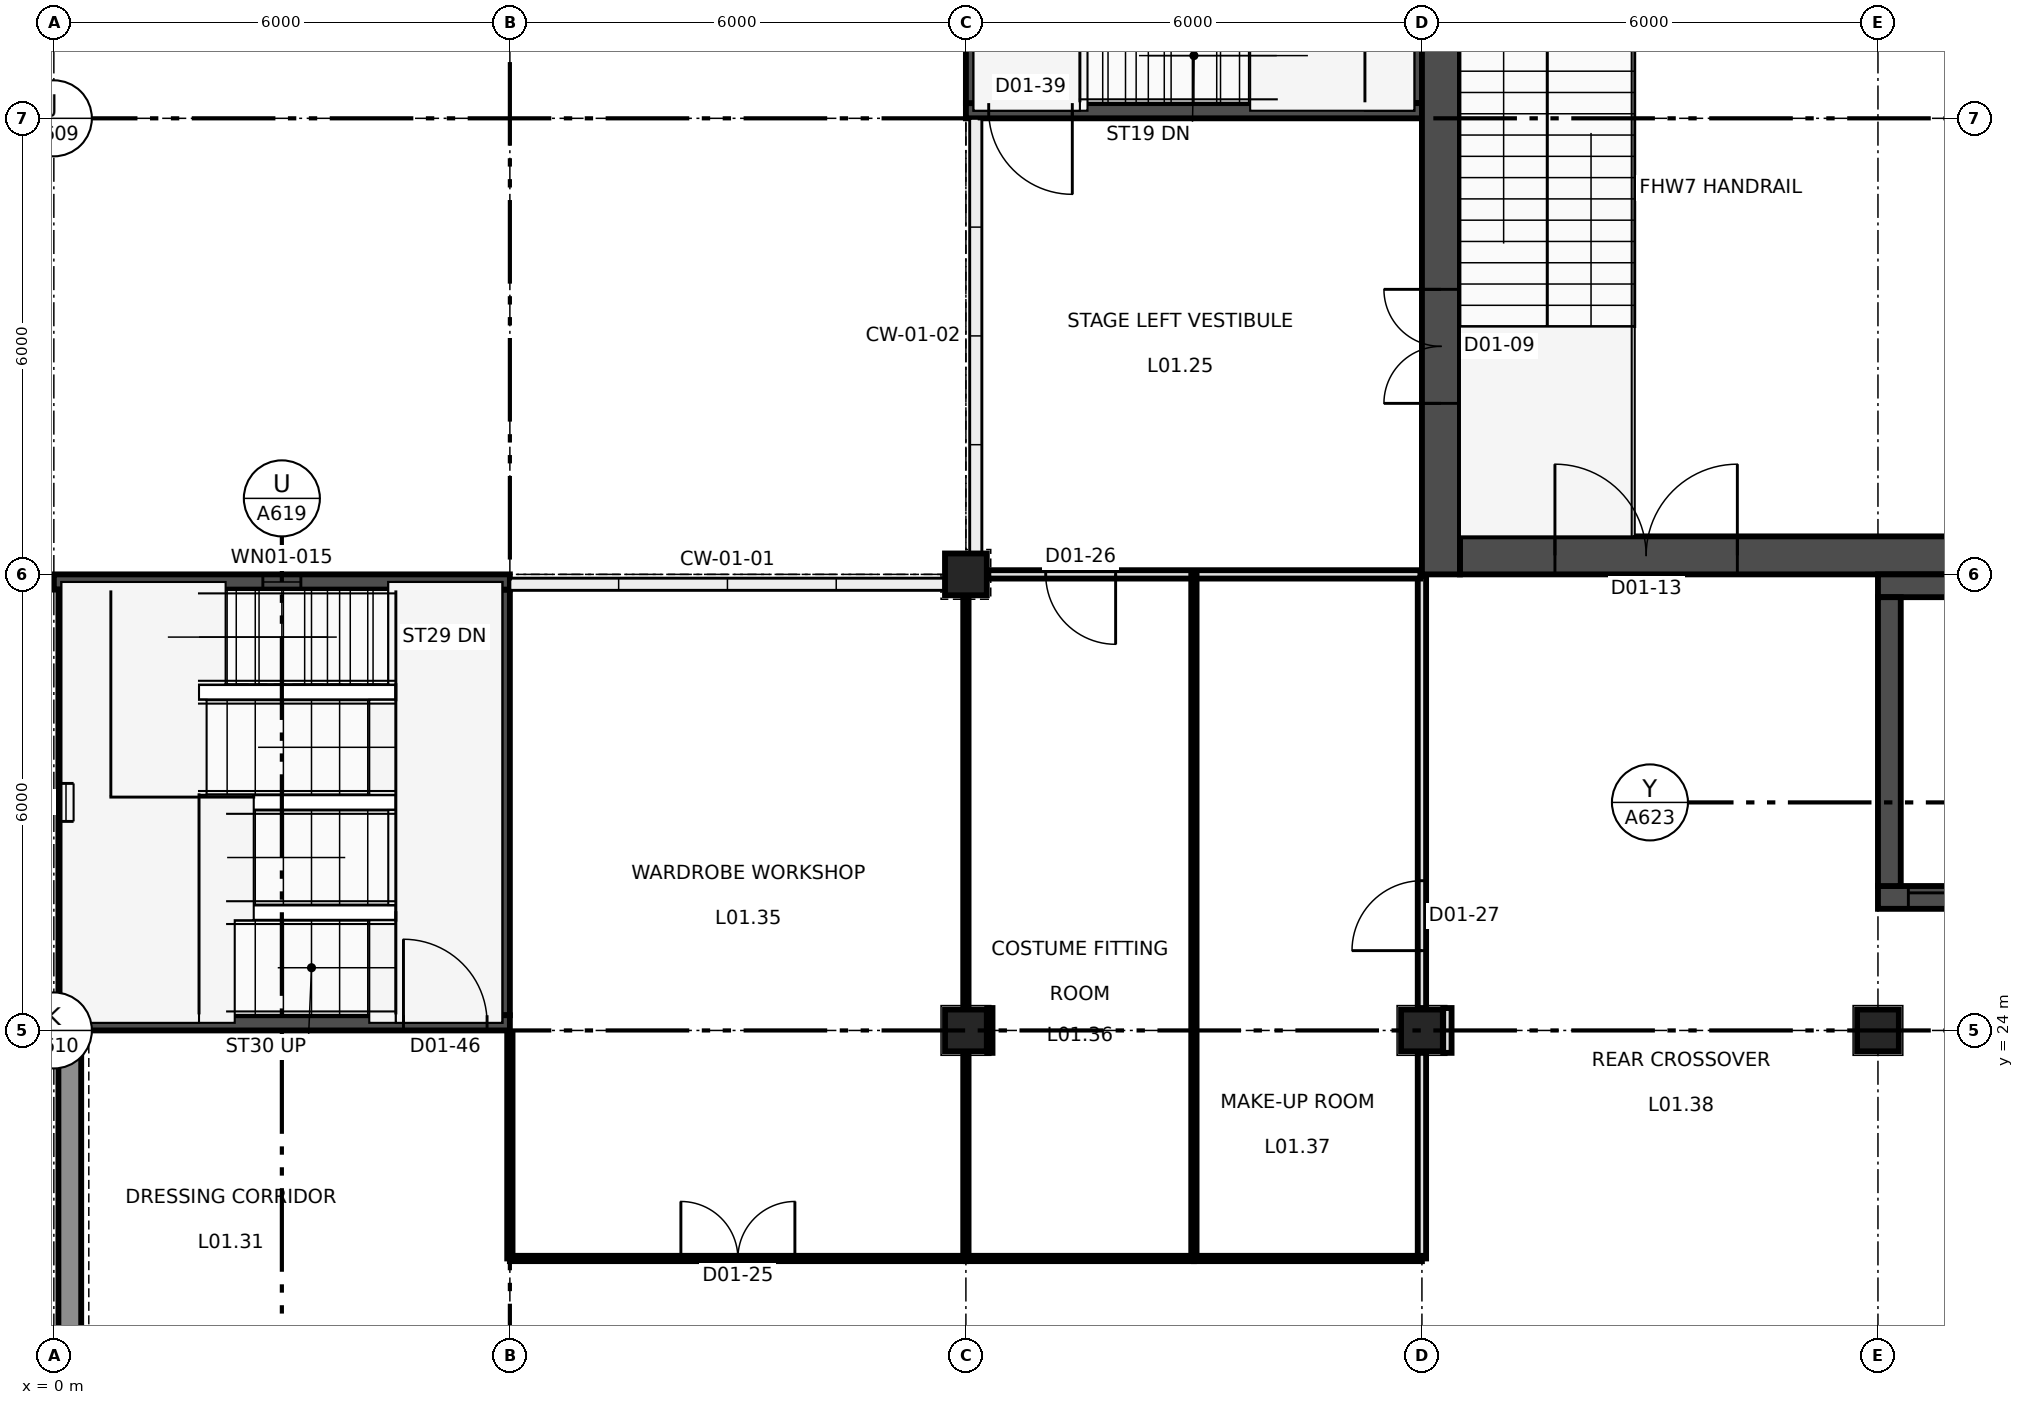
"""IFC4 building model, lengths in metres.
Left out: names, types, materials, properties, quantities, classifications, styles, units other than length and angle.
Written with IfcOpenShell. Run it as: python <this file> out.ifc"""

import sys

from ifc_helpers import new_model, si_unit, direction, frame, frame_2d, origin, origin_2d, place, context, subcontext, project, spatial, rectangle, extrude, element, fill, save


model = new_model("IFC4")
c1 = context("Model", 3, precision=1e-05, world=origin(), true_north=direction((0.0, 1.0)))
c2 = subcontext(c1, "Body", "Model", "MODEL_VIEW")
j1 = project(units=[si_unit("LENGTHUNIT", "METRE"), si_unit("PLANEANGLEUNIT", "RADIAN")], contexts=[c1])
p1 = place(None, origin())
s1 = spatial("IfcSite", under=j1, at=p1, CompositionType="ELEMENT")
p2 = place(p1, origin())
s2 = spatial("IfcBuilding", under=s1, at=p2, CompositionType="ELEMENT")
p3 = place(p2, frame((0.0, 0.0, 7.0)))
s3 = spatial("IfcBuildingStorey", under=s2, at=p3, CompositionType="ELEMENT", Elevation=7.0)
for number, where, z_axis, x_axis in (
    (1, (12.0, 24.0, 0.0), (0.0, 0.0, 1.0), (1.0, 0.0, 0.0)),
    (2, (18.0, 24.0, 0.0), (0.0, 0.0, 1.0), (1.0, 0.0, 0.0)),
    (3, (24.0, 24.0, 0.0), (0.0, 0.0, 1.0), (1.0, 0.0, 0.0)),
    (4, (12.0, 30.0, 0.0), (0.0, 0.0, 1.0), (1.0, 0.0, 0.0)),
):
    element("IfcColumn", number, at=place(p3, frame(where, z_axis=z_axis, x_axis=x_axis)), inside=s3, PredefinedType="COLUMN", context=c2, shape_type="SweptSolid", body=[
        extrude(rectangle(XDim=0.55, YDim=0.55, at=origin_2d()), origin(), (0.0, 0.0, 1.0), 5.0),
    ])
p4 = place(p3, frame((12.0, 36.1, 0.0), z_axis=(0.0, 0.0, 1.0), x_axis=(1.0, 0.0, 0.0)))
e5 = element("IfcWall", 5, at=p4, inside=s3, PredefinedType="SHEAR", context=c2, shape_type="SweptSolid", body=[
    extrude(rectangle(XDim=6.0, YDim=0.2, at=frame_2d((3.0, 0.0))), origin(), (0.0, 0.0, 1.0), 5.0),
])
p5 = place(p4, frame((0.3, 0.0, 0.0)))
e6 = element("IfcOpeningElement", 6, at=p5, cuts=e5, PredefinedType="OPENING", context=c2, shape_type="SweptSolid", body=[
    extrude(rectangle(XDim=1.1, YDim=2.2, at=frame_2d((0.55, 1.1))), frame((0.0, 0.11, 0.0), z_axis=(0.0, -1.0, 0.0), x_axis=(1.0, 0.0, 0.0)), (0.0, 0.0, 1.0), 0.22),
])
for number, where, z_axis, x_axis in (
    (7, (12.1, 36.2, 0.0), (0.0, 0.0, 1.0), (0.0, 1.0, 0.0)),
    (8, (17.9, 36.2, 0.0), (0.0, 0.0, 1.0), (0.0, 1.0, 0.0)),
):
    element("IfcWall", number, at=place(p3, frame(where, z_axis=z_axis, x_axis=x_axis)), inside=s3, PredefinedType="SHEAR", context=c2, shape_type="SweptSolid", body=[
        extrude(rectangle(XDim=5.6, YDim=0.2, at=frame_2d((2.8, 0.0))), origin(), (0.0, 0.0, 1.0), 5.0),
    ])
p6 = place(p3, frame((0.0, 29.9, 0.0), z_axis=(0.0, 0.0, 1.0), x_axis=(1.0, 0.0, 0.0)))
e9 = element("IfcWall", 9, at=p6, inside=s3, PredefinedType="SHEAR", context=c2, shape_type="SweptSolid", body=[
    extrude(rectangle(XDim=6.0, YDim=0.2, at=frame_2d((3.0, 0.0))), origin(), (0.0, 0.0, 1.0), 5.0),
])
p7 = place(p6, frame((2.75, 0.0, 0.9)))
e10 = element("IfcOpeningElement", 10, at=p7, cuts=e9, PredefinedType="OPENING", context=c2, shape_type="SweptSolid", body=[
    extrude(rectangle(XDim=0.5, YDim=2.1, at=frame_2d((0.25, 1.05))), frame((0.0, 0.11, 0.0), z_axis=(0.0, -1.0, 0.0), x_axis=(1.0, 0.0, 0.0)), (0.0, 0.0, 1.0), 0.22),
])
p8 = place(p3, frame((0.0, 24.1, 0.0), z_axis=(0.0, 0.0, 1.0), x_axis=(1.0, 0.0, 0.0)))
e11 = element("IfcWall", 11, at=p8, inside=s3, PredefinedType="SHEAR", context=c2, shape_type="SweptSolid", body=[
    extrude(rectangle(XDim=6.0, YDim=0.2, at=frame_2d((3.0, 0.0))), origin(), (0.0, 0.0, 1.0), 5.0),
])
p9 = place(p8, frame((4.6, 0.0, 0.0)))
e12 = element("IfcOpeningElement", 12, at=p9, cuts=e11, PredefinedType="OPENING", context=c2, shape_type="SweptSolid", body=[
    extrude(rectangle(XDim=1.1, YDim=2.2, at=frame_2d((0.55, 1.1))), frame((0.0, 0.11, 0.0), z_axis=(0.0, -1.0, 0.0), x_axis=(1.0, 0.0, 0.0)), (0.0, 0.0, 1.0), 0.22),
])
p10 = place(p3, frame((0.16, 24.2, 0.0), z_axis=(0.0, 0.0, 1.0), x_axis=(0.0, 1.0, 0.0)))
e13 = element("IfcWall", 13, at=p10, inside=s3, PredefinedType="SHEAR", context=c2, shape_type="SweptSolid", body=[
    extrude(rectangle(XDim=5.6, YDim=0.2, at=frame_2d((2.8, 0.0))), origin(), (0.0, 0.0, 1.0), 5.0),
])
p11 = place(p10, frame((2.55, 0.0, 0.9)))
e14 = element("IfcOpeningElement", 14, at=p11, cuts=e13, PredefinedType="OPENING", context=c2, shape_type="SweptSolid", body=[
    extrude(rectangle(XDim=0.5, YDim=2.1, at=frame_2d((0.25, 1.05))), frame((0.0, 0.11, 0.0), z_axis=(0.0, -1.0, 0.0), x_axis=(1.0, 0.0, 0.0)), (0.0, 0.0, 1.0), 0.22),
])
p12 = place(p3, frame((5.9, 24.2, 0.0), z_axis=(0.0, 0.0, 1.0), x_axis=(0.0, 1.0, 0.0)))
e15 = element("IfcWall", 15, at=p12, inside=s3, PredefinedType="SHEAR", context=c2, shape_type="SweptSolid", body=[
    extrude(rectangle(XDim=5.6, YDim=0.2, at=frame_2d((2.8, 0.0))), origin(), (0.0, 0.0, 1.0), 5.0),
])
p13 = place(p3, frame((24.0, 29.85, 0.0), z_axis=(0.0, 0.0, 1.0), x_axis=(1.0, 0.0, 0.0)))
e16 = element("IfcWall", 16, at=p13, inside=s3, PredefinedType="SHEAR", context=c2, shape_type="SweptSolid", body=[
    extrude(rectangle(XDim=3.2, YDim=0.3, at=frame_2d((1.6, 0.0))), origin(), (0.0, 0.0, 1.0), 5.0),
])
p14 = place(p3, frame((24.0, 25.75, 0.0), z_axis=(0.0, 0.0, 1.0), x_axis=(1.0, 0.0, 0.0)))
e17 = element("IfcWall", 17, at=p14, inside=s3, PredefinedType="SHEAR", context=c2, shape_type="SweptSolid", body=[
    extrude(rectangle(XDim=3.2, YDim=0.3, at=frame_2d((1.6, 0.0))), origin(), (0.0, 0.0, 1.0), 5.0),
])
p15 = place(p14, frame((0.4, 0.0, 0.0)))
e18 = element("IfcOpeningElement", 18, at=p15, cuts=e17, PredefinedType="OPENING", context=c2, shape_type="SweptSolid", body=[
    extrude(rectangle(XDim=2.4, YDim=2.4, at=frame_2d((1.2, 1.2))), frame((0.0, 0.16, 0.0), z_axis=(0.0, -1.0, 0.0), x_axis=(1.0, 0.0, 0.0)), (0.0, 0.0, 1.0), 0.32),
])
p16 = place(p3, frame((24.15, 25.9, 0.0), z_axis=(0.0, 0.0, 1.0), x_axis=(0.0, 1.0, 0.0)))
e19 = element("IfcWall", 19, at=p16, inside=s3, PredefinedType="SHEAR", context=c2, shape_type="SweptSolid", body=[
    extrude(rectangle(XDim=3.8, YDim=0.3, at=frame_2d((1.9, 0.0))), origin(), (0.0, 0.0, 1.0), 5.0),
])
p17 = place(p3, frame((0.21, 6.0, 0.0), z_axis=(0.0, 0.0, 1.0), x_axis=(0.0, 1.0, 0.0)))
e20 = element("IfcWall", 20, at=p17, inside=s3, PredefinedType="SOLIDWALL", context=c2, shape_type="SweptSolid", body=[
    extrude(rectangle(XDim=18.0, YDim=0.3, at=frame_2d((9.0, 0.0))), origin(), (0.0, 0.0, 1.0), 5.0),
])
p18 = place(p3, frame((18.25, 30.0, 0.0), z_axis=(0.0, 0.0, 1.0), x_axis=(0.0, 1.0, 0.0)))
e21 = element("IfcWall", 21, at=p18, inside=s3, PredefinedType="SHEAR", context=c2, shape_type="SweptSolid", body=[
    extrude(rectangle(XDim=24.0, YDim=0.5, at=frame_2d((12.0, 0.0))), origin(), (0.0, 0.0, 1.0), 5.0),
])
p19 = place(p18, frame((2.25, 0.0, 0.0)))
e22 = element("IfcOpeningElement", 22, at=p19, cuts=e21, PredefinedType="OPENING", context=c2, shape_type="SweptSolid", body=[
    extrude(rectangle(XDim=1.5, YDim=2.1, at=frame_2d((0.75, 1.05))), frame((0.0, 0.26, 0.0), z_axis=(0.0, -1.0, 0.0), x_axis=(1.0, 0.0, 0.0)), (0.0, 0.0, 1.0), 0.52),
])
p20 = place(p18, frame((14.25, 0.0, 0.0)))
e23 = element("IfcOpeningElement", 23, at=p20, cuts=e21, PredefinedType="OPENING", context=c2, shape_type="SweptSolid", body=[
    extrude(rectangle(XDim=1.5, YDim=2.1, at=frame_2d((0.75, 1.05))), frame((0.0, 0.26, 0.0), z_axis=(0.0, -1.0, 0.0), x_axis=(1.0, 0.0, 0.0)), (0.0, 0.0, 1.0), 0.52),
])
p21 = place(p3, frame((18.5, 30.25, 0.0), z_axis=(0.0, 0.0, 1.0), x_axis=(1.0, 0.0, 0.0)))
e24 = element("IfcWall", 24, at=p21, inside=s3, PredefinedType="SHEAR", context=c2, shape_type="SweptSolid", body=[
    extrude(rectangle(XDim=29.0, YDim=0.5, at=frame_2d((14.5, 0.0))), origin(), (0.0, 0.0, 1.0), 5.0),
])
p22 = place(p21, frame((1.25, 0.0, 0.0)))
e25 = element("IfcOpeningElement", 25, at=p22, cuts=e24, PredefinedType="OPENING", context=c2, shape_type="SweptSolid", body=[
    extrude(rectangle(XDim=2.4, YDim=3.6, at=frame_2d((1.2, 1.8))), frame((0.0, 0.26, 0.0), z_axis=(0.0, -1.0, 0.0), x_axis=(1.0, 0.0, 0.0)), (0.0, 0.0, 1.0), 0.52),
])
p23 = place(p21, frame((25.75, 0.0, 0.0)))
e26 = element("IfcOpeningElement", 26, at=p23, cuts=e24, PredefinedType="OPENING", context=c2, shape_type="SweptSolid", body=[
    extrude(rectangle(XDim=1.5, YDim=2.1, at=frame_2d((0.75, 1.05))), frame((0.0, 0.26, 0.0), z_axis=(0.0, -1.0, 0.0), x_axis=(1.0, 0.0, 0.0)), (0.0, 0.0, 1.0), 0.52),
])
p24 = place(p3, frame((18.0, 21.0, 0.0), z_axis=(0.0, 0.0, 1.0), x_axis=(0.0, 1.0, 0.0)))
e27 = element("IfcWall", 27, at=p24, inside=s3, PredefinedType="PARTITIONING", context=c2, shape_type="SweptSolid", body=[
    extrude(rectangle(XDim=2.705, YDim=0.11, at=frame_2d((1.353, 0.0))), origin(), (0.0, 0.0, 1.0), 4.05),
])
p25 = place(p3, frame((18.0, 24.295, 0.0), z_axis=(0.0, 0.0, 1.0), x_axis=(0.0, 1.0, 0.0)))
e28 = element("IfcWall", 28, at=p25, inside=s3, PredefinedType="PARTITIONING", context=c2, shape_type="SweptSolid", body=[
    extrude(rectangle(XDim=5.685, YDim=0.11, at=frame_2d((2.843, 0.0))), origin(), (0.0, 0.0, 1.0), 4.05),
])
p26 = place(p25, frame((0.755, 0.0, 0.0)))
e29 = element("IfcOpeningElement", 29, at=p26, cuts=e28, PredefinedType="OPENING", context=c2, shape_type="SweptSolid", body=[
    extrude(rectangle(XDim=0.92, YDim=2.04, at=frame_2d((0.46, 1.02))), frame((0.0, 0.065, 0.0), z_axis=(0.0, -1.0, 0.0), x_axis=(1.0, 0.0, 0.0)), (0.0, 0.0, 1.0), 0.13),
])
p27 = place(p3, frame((18.335, 23.705, 0.0), z_axis=(0.0, 0.0, 1.0), x_axis=(0.0, 1.0, 0.0)))
e30 = element("IfcWall", 30, at=p27, inside=s3, PredefinedType="PARTITIONING", context=c2, shape_type="SweptSolid", body=[
    extrude(rectangle(XDim=0.59, YDim=0.11, at=frame_2d((0.295, 0.0))), origin(), (0.0, 0.0, 1.0), 4.05),
])
p28 = place(p3, frame((12.295, 30.0, 0.0), z_axis=(0.0, 0.0, 1.0), x_axis=(1.0, 0.0, 0.0)))
e31 = element("IfcWall", 31, at=p28, inside=s3, PredefinedType="PARTITIONING", context=c2, shape_type="SweptSolid", body=[
    extrude(rectangle(XDim=5.685, YDim=0.11, at=frame_2d((2.843, 0.0))), origin(), (0.0, 0.0, 1.0), 4.05),
])
p29 = place(p28, frame((0.755, 0.0, 0.0)))
e32 = element("IfcOpeningElement", 32, at=p29, cuts=e31, PredefinedType="OPENING", context=c2, shape_type="SweptSolid", body=[
    extrude(rectangle(XDim=0.92, YDim=2.04, at=frame_2d((0.46, 1.02))), frame((0.0, 0.065, 0.0), z_axis=(0.0, -1.0, 0.0), x_axis=(1.0, 0.0, 0.0)), (0.0, 0.0, 1.0), 0.13),
])
p30 = place(p3, frame((6.0, 21.0, 0.0), z_axis=(0.0, 0.0, 1.0), x_axis=(0.0, 1.0, 0.0)))
e33 = element("IfcWall", 33, at=p30, inside=s3, PredefinedType="PARTITIONING", context=c2, shape_type="SweptSolid", body=[
    extrude(rectangle(XDim=2.98, YDim=0.07, at=frame_2d((1.49, 0.0))), origin(), (0.0, 0.0, 1.0), 4.05),
])
p31 = place(p3, frame((6.0, 21.0, 0.0), z_axis=(0.0, 0.0, 1.0), x_axis=(1.0, 0.0, 0.0)))
e34 = element("IfcWall", 34, at=p31, inside=s3, PredefinedType="PARTITIONING", context=c2, shape_type="SweptSolid", body=[
    extrude(rectangle(XDim=6.0, YDim=0.07, at=frame_2d((3.0, 0.0))), origin(), (0.0, 0.0, 1.0), 4.05),
])
p32 = place(p31, frame((2.25, 0.0, 0.0)))
e35 = element("IfcOpeningElement", 35, at=p32, cuts=e34, PredefinedType="OPENING", context=c2, shape_type="SweptSolid", body=[
    extrude(rectangle(XDim=1.5, YDim=2.1, at=frame_2d((0.75, 1.05))), frame((0.0, 0.045, 0.0), z_axis=(0.0, -1.0, 0.0), x_axis=(1.0, 0.0, 0.0)), (0.0, 0.0, 1.0), 0.09),
])
p33 = place(p3, frame((12.0, 21.0, 0.0), z_axis=(0.0, 0.0, 1.0), x_axis=(1.0, 0.0, 0.0)))
e36 = element("IfcWall", 36, at=p33, inside=s3, PredefinedType="PARTITIONING", context=c2, shape_type="SweptSolid", body=[
    extrude(rectangle(XDim=3.0, YDim=0.07, at=frame_2d((1.5, 0.0))), origin(), (0.0, 0.0, 1.0), 4.05),
])
p34 = place(p3, frame((12.0, 24.295, 0.0), z_axis=(0.0, 0.0, 1.0), x_axis=(0.0, 1.0, 0.0)))
e37 = element("IfcWall", 37, at=p34, inside=s3, PredefinedType="PARTITIONING", context=c2, shape_type="SweptSolid", body=[
    extrude(rectangle(XDim=5.41, YDim=0.07, at=frame_2d((2.705, 0.0))), origin(), (0.0, 0.0, 1.0), 4.05),
])
p35 = place(p3, frame((12.0, 21.0, 0.0), z_axis=(0.0, 0.0, 1.0), x_axis=(0.0, 1.0, 0.0)))
e38 = element("IfcWall", 38, at=p35, inside=s3, PredefinedType="PARTITIONING", context=c2, shape_type="SweptSolid", body=[
    extrude(rectangle(XDim=2.705, YDim=0.07, at=frame_2d((1.353, 0.0))), origin(), (0.0, 0.0, 1.0), 4.05),
])
p36 = place(p3, frame((12.315, 23.705, 0.0), z_axis=(0.0, 0.0, 1.0), x_axis=(0.0, 1.0, 0.0)))
e39 = element("IfcWall", 39, at=p36, inside=s3, PredefinedType="PARTITIONING", context=c2, shape_type="SweptSolid", body=[
    extrude(rectangle(XDim=0.59, YDim=0.07, at=frame_2d((0.295, 0.0))), origin(), (0.0, 0.0, 1.0), 4.05),
])
p37 = place(p3, frame((15.0, 21.0, 0.0), z_axis=(0.0, 0.0, 1.0), x_axis=(1.0, 0.0, 0.0)))
e40 = element("IfcWall", 40, at=p37, inside=s3, PredefinedType="PARTITIONING", context=c2, shape_type="SweptSolid", body=[
    extrude(rectangle(XDim=3.0, YDim=0.07, at=frame_2d((1.5, 0.0))), origin(), (0.0, 0.0, 1.0), 4.05),
])
p38 = place(p3, frame((15.0, 21.0, 0.0), z_axis=(0.0, 0.0, 1.0), x_axis=(0.0, 1.0, 0.0)))
e41 = element("IfcWall", 41, at=p38, inside=s3, PredefinedType="PARTITIONING", context=c2, shape_type="SweptSolid", body=[
    extrude(rectangle(XDim=9.0, YDim=0.07, at=frame_2d((4.5, 0.0))), origin(), (0.0, 0.0, 1.0), 4.05),
])
p39 = place(p7, origin())
e42 = element("IfcWindow", 42, at=p39, inside=s3, PartitioningType="SINGLE_PANEL", PredefinedType="WINDOW", context=c2, shape_type="SweptSolid", body=[
    extrude(rectangle(XDim=0.5, YDim=2.1, at=frame_2d((0.25, 1.05))), frame((0.0, 0.03, 0.0), z_axis=(0.0, -1.0, 0.0), x_axis=(1.0, 0.0, 0.0)), (0.0, 0.0, 1.0), 0.06),
])
fill(e10, e42)
p40 = place(p11, origin())
e43 = element("IfcWindow", 43, at=p40, inside=s3, PartitioningType="SINGLE_PANEL", PredefinedType="WINDOW", context=c2, shape_type="SweptSolid", body=[
    extrude(rectangle(XDim=0.5, YDim=2.1, at=frame_2d((0.25, 1.05))), frame((0.0, 0.03, 0.0), z_axis=(0.0, -1.0, 0.0), x_axis=(1.0, 0.0, 0.0)), (0.0, 0.0, 1.0), 0.06),
])
fill(e14, e43)
p41 = place(p19, origin())
e44 = element("IfcDoor", 44, at=p41, inside=s3, OperationType="DOUBLE_DOOR_SINGLE_SWING", PredefinedType="DOOR", context=c2, shape_type="SweptSolid", body=[
    extrude(rectangle(XDim=1.5, YDim=2.1, at=frame_2d((0.75, 1.05))), frame((0.0, 0.025, 0.0), z_axis=(0.0, -1.0, 0.0), x_axis=(1.0, 0.0, 0.0)), (0.0, 0.0, 1.0), 0.05),
])
fill(e22, e44)
p42 = place(p22, frame((2.4, 0.0, 0.0), z_axis=(0.0, 0.0, 1.0), x_axis=(-1.0, 0.0, 0.0)))
e45 = element("IfcDoor", 45, at=p42, inside=s3, OperationType="DOUBLE_DOOR_SINGLE_SWING", PredefinedType="DOOR", context=c2, shape_type="SweptSolid", body=[
    extrude(rectangle(XDim=2.4, YDim=3.6, at=frame_2d((1.2, 1.8))), frame((0.0, 0.025, 0.0), z_axis=(0.0, -1.0, 0.0), x_axis=(1.0, 0.0, 0.0)), (0.0, 0.0, 1.0), 0.05),
])
fill(e25, e45)
p43 = place(p32, origin())
e46 = element("IfcDoor", 46, at=p43, inside=s3, OperationType="DOUBLE_DOOR_SINGLE_SWING", PredefinedType="DOOR", context=c2, shape_type="SweptSolid", body=[
    extrude(rectangle(XDim=1.5, YDim=2.1, at=frame_2d((0.75, 1.05))), frame((0.0, 0.025, 0.0), z_axis=(0.0, -1.0, 0.0), x_axis=(1.0, 0.0, 0.0)), (0.0, 0.0, 1.0), 0.05),
])
fill(e35, e46)
p44 = place(p29, frame((0.92, 0.0, 0.0), z_axis=(0.0, 0.0, 1.0), x_axis=(-1.0, 0.0, 0.0)))
e47 = element("IfcDoor", 47, at=p44, inside=s3, OperationType="SINGLE_SWING_RIGHT", PredefinedType="DOOR", context=c2, shape_type="SweptSolid", body=[
    extrude(rectangle(XDim=0.92, YDim=2.04, at=frame_2d((0.46, 1.02))), frame((0.0, 0.025, 0.0), z_axis=(0.0, -1.0, 0.0), x_axis=(1.0, 0.0, 0.0)), (0.0, 0.0, 1.0), 0.05),
])
fill(e32, e47)
p45 = place(p26, origin())
e48 = element("IfcDoor", 48, at=p45, inside=s3, OperationType="SINGLE_SWING_LEFT", PredefinedType="DOOR", context=c2, shape_type="SweptSolid", body=[
    extrude(rectangle(XDim=0.92, YDim=2.04, at=frame_2d((0.46, 1.02))), frame((0.0, 0.025, 0.0), z_axis=(0.0, -1.0, 0.0), x_axis=(1.0, 0.0, 0.0)), (0.0, 0.0, 1.0), 0.05),
])
fill(e29, e48)
p46 = place(p5, origin())
e49 = element("IfcDoor", 49, at=p46, inside=s3, OperationType="SINGLE_SWING_RIGHT", PredefinedType="DOOR", context=c2, shape_type="SweptSolid", body=[
    extrude(rectangle(XDim=1.1, YDim=2.2, at=frame_2d((0.55, 1.1))), frame((0.0, 0.025, 0.0), z_axis=(0.0, -1.0, 0.0), x_axis=(1.0, 0.0, 0.0)), (0.0, 0.0, 1.0), 0.05),
])
fill(e6, e49)
p47 = place(p9, origin())
e50 = element("IfcDoor", 50, at=p47, inside=s3, OperationType="SINGLE_SWING_LEFT", PredefinedType="DOOR", context=c2, shape_type="SweptSolid", body=[
    extrude(rectangle(XDim=1.1, YDim=2.2, at=frame_2d((0.55, 1.1))), frame((0.0, 0.025, 0.0), z_axis=(0.0, -1.0, 0.0), x_axis=(1.0, 0.0, 0.0)), (0.0, 0.0, 1.0), 0.05),
])
fill(e12, e50)
p48 = place(p15, origin())
e51 = element("IfcDoor", 51, at=p48, inside=s3, OperationType="DOUBLE_DOOR_SLIDING", PredefinedType="DOOR", context=c2, shape_type="SweptSolid", body=[
    extrude(rectangle(XDim=2.4, YDim=2.4, at=frame_2d((1.2, 1.2))), frame((0.0, 0.025, 0.0), z_axis=(0.0, -1.0, 0.0), x_axis=(1.0, 0.0, 0.0)), (0.0, 0.0, 1.0), 0.05),
])
fill(e18, e51)
save(model, sys.argv[1])
